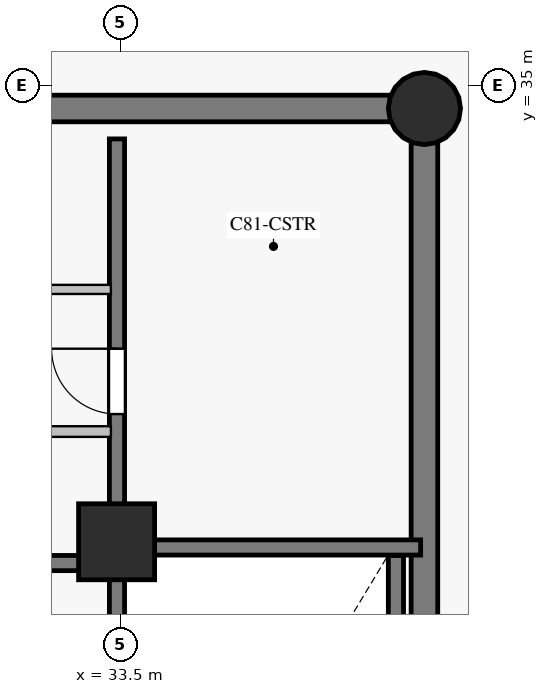
"""IFC4 building model, lengths in metres.
Left out: names, types, materials, properties, quantities, classifications, styles, units other than length and angle.
Written with IfcOpenShell. Run it as: python <this file> out.ifc"""

import sys

from ifc_helpers import new_model, si_unit, direction, frame, frame_2d, origin, origin_with_axes, origin_2d, place, context, subcontext, project, spatial, rectangle, circle, extrude, source, transform, mapped, element, fill, save


model = new_model("IFC4")
c1 = context("Model", 3, precision=1e-05, world=origin(), true_north=direction((0.0, 1.0)))
c2 = subcontext(c1, "Body", "Model", "MODEL_VIEW")
j1 = project(units=[si_unit("LENGTHUNIT", "METRE"), si_unit("PLANEANGLEUNIT", "RADIAN")], contexts=[c1])
p1 = place(None, origin())
s1 = spatial("IfcSite", under=j1, at=p1, CompositionType="ELEMENT")
p2 = place(p1, origin())
s2 = spatial("IfcBuilding", under=s1, at=p2, CompositionType="ELEMENT")
p3 = place(p2, frame((0.0, 0.0, 273.4)))
s3 = spatial("IfcBuildingStorey", under=s2, at=p3, CompositionType="ELEMENT", Elevation=273.4)
p4 = place(p3, frame((37.5, 18.3, 0.0), z_axis=(0.0, 0.0, 1.0), x_axis=(0.0, 1.0, 0.0)))
e1 = element("IfcWall", 1, at=p4, inside=s3, PredefinedType="SHEAR", context=c2, shape_type="SweptSolid", body=[
    extrude(rectangle(XDim=16.4, YDim=0.35, at=frame_2d((8.2, 0.0))), origin(), (0.0, 0.0, 1.0), 16.35),
])
p5 = place(p3, frame((37.5, 34.7, 0.0), z_axis=(0.0, 0.0, 1.0), x_axis=(-1.0, 0.0, 0.0)))
e2 = element("IfcWall", 2, at=p5, inside=s3, PredefinedType="SHEAR", context=c2, shape_type="SweptSolid", body=[
    extrude(rectangle(XDim=10.95, YDim=0.35, at=frame_2d((5.475, 0.0))), origin(), (0.0, 0.0, 1.0), 16.35),
])
p6 = place(p5, frame((7.16, 0.0, 0.0)))
e3 = element("IfcOpeningElement", 3, at=p6, cuts=e2, PredefinedType="OPENING", context=c2, shape_type="SweptSolid", body=[
    extrude(rectangle(XDim=1.1, YDim=2.15, at=frame_2d((0.55, 1.075))), frame((0.0, 0.185, 0.0), z_axis=(0.0, -1.0, 0.0), x_axis=(1.0, 0.0, 0.0)), (0.0, 0.0, 1.0), 0.37),
])
p7 = place(p5, frame((5.16, 0.0, 0.0)))
e4 = element("IfcOpeningElement", 4, at=p7, cuts=e2, PredefinedType="OPENING", context=c2, shape_type="SweptSolid", body=[
    extrude(rectangle(XDim=1.1, YDim=2.15, at=frame_2d((0.55, 1.075))), frame((0.0, 0.185, 0.0), z_axis=(0.0, -1.0, 0.0), x_axis=(1.0, 0.0, 0.0)), (0.0, 0.0, 1.0), 0.37),
])
m1 = source(origin_with_axes(), c2, "Body", "SweptSolid", [
    extrude(circle(Radius=0.475, at=origin_2d()), origin(), (0.0, 0.0, 1.0), 16.6),
])
p8 = place(p3, frame((37.5, 34.7, 0.0), z_axis=(0.0, 0.0, 1.0), x_axis=(1.0, 0.0, 0.0)))
e5 = element("IfcColumn", 5, at=p8, inside=s3, PredefinedType="COLUMN", context=c2, shape_type="MappedRepresentation", body=[
    mapped(m1, transform((0.0, 0.0, 0.0), scale=1.0)),
])
m2 = source(origin_with_axes(), c2, "Body", "SweptSolid", [
    extrude(rectangle(XDim=1.0, YDim=1.0, at=origin_2d()), origin(), (0.0, 0.0, 1.0), 16.6),
])
p9 = place(p3, frame((33.45, 29.0, 0.0), z_axis=(0.0, 0.0, 1.0), x_axis=(1.0, 0.0, 0.0)))
e6 = element("IfcColumn", 6, at=p9, inside=s3, PredefinedType="COLUMN", context=c2, shape_type="MappedRepresentation", body=[
    mapped(m2, transform((0.0, 0.0, 0.0), scale=1.0)),
])
p10 = place(p3, frame((33.455, 18.7, 0.0), z_axis=(0.0, 0.0, 1.0), x_axis=(0.0, 1.0, 0.0)))
e7 = element("IfcWall", 7, at=p10, inside=s3, PredefinedType="SHEAR", context=c2, shape_type="SweptSolid", body=[
    extrude(rectangle(XDim=15.6, YDim=0.2, at=frame_2d((7.8, 0.0))), origin(), (0.0, 0.0, 1.0), 16.35),
])
p11 = place(p10, frame((2.75, 0.0, 0.0)))
e8 = element("IfcOpeningElement", 8, at=p11, cuts=e7, PredefinedType="OPENING", context=c2, shape_type="SweptSolid", body=[
    extrude(rectangle(XDim=1.15, YDim=2.15, at=frame_2d((0.575, 1.075))), frame((0.0, 0.11, 0.0), z_axis=(0.0, -1.0, 0.0), x_axis=(1.0, 0.0, 0.0)), (0.0, 0.0, 1.0), 0.22),
])
p12 = place(p10, frame((0.55, 0.0, 0.0)))
e9 = element("IfcOpeningElement", 9, at=p12, cuts=e7, PredefinedType="OPENING", context=c2, shape_type="SweptSolid", body=[
    extrude(rectangle(XDim=0.94, YDim=2.1, at=frame_2d((0.47, 1.05))), frame((0.0, 0.11, 0.0), z_axis=(0.0, -1.0, 0.0), x_axis=(1.0, 0.0, 0.0)), (0.0, 0.0, 1.0), 0.22),
])
p13 = place(p10, frame((11.98, 0.0, 0.0)))
e10 = element("IfcOpeningElement", 10, at=p13, cuts=e7, PredefinedType="OPENING", context=c2, shape_type="SweptSolid", body=[
    extrude(rectangle(XDim=0.86, YDim=2.04, at=frame_2d((0.43, 1.02))), frame((0.0, 0.11, 0.0), z_axis=(0.0, -1.0, 0.0), x_axis=(1.0, 0.0, 0.0)), (0.0, 0.0, 1.0), 0.22),
])
p14 = place(p3, frame((23.7, 28.72, 0.0), z_axis=(0.0, 0.0, 1.0), x_axis=(1.0, 0.0, 0.0)))
e11 = element("IfcWall", 11, at=p14, inside=s3, PredefinedType="SHEAR", context=c2, shape_type="SweptSolid", body=[
    extrude(rectangle(XDim=9.6, YDim=0.2, at=frame_2d((4.8, 0.0))), origin(), (0.0, 0.0, 1.0), 16.35),
])
p15 = place(p14, frame((4.2, 0.0, 0.0)))
e12 = element("IfcOpeningElement", 12, at=p15, cuts=e11, PredefinedType="OPENING", context=c2, shape_type="SweptSolid", body=[
    extrude(rectangle(XDim=1.0, YDim=2.15, at=frame_2d((0.5, 1.075))), frame((0.0, 0.11, 0.0), z_axis=(0.0, -1.0, 0.0), x_axis=(1.0, 0.0, 0.0)), (0.0, 0.0, 1.0), 0.22),
])
p16 = place(p3, frame((37.125, 21.32, 0.0), z_axis=(0.0, 0.0, 1.0), x_axis=(0.0, 1.0, 0.0)))
e13 = element("IfcWall", 13, at=p16, inside=s3, PredefinedType="SHEAR", context=c2, shape_type="SweptSolid", body=[
    extrude(rectangle(XDim=7.5, YDim=0.2, at=frame_2d((3.75, 0.0))), origin(), (0.0, 0.0, 1.0), 16.35),
])
p17 = place(p3, frame((33.455, 28.925, 0.0), z_axis=(0.0, 0.0, 1.0), x_axis=(1.0, 0.0, 0.0)))
e14 = element("IfcWall", 14, at=p17, inside=s3, PredefinedType="SHEAR", context=c2, shape_type="SweptSolid", body=[
    extrude(rectangle(XDim=3.995, YDim=0.2, at=frame_2d((1.998, 0.0))), origin(), (0.0, 0.0, 1.0), 16.35),
])
p18 = place(p3, frame((31.3, 30.45, 0.0), z_axis=(0.0, 0.0, 1.0), x_axis=(1.0, 0.0, 0.0)))
e15 = element("IfcWall", 15, at=p18, inside=s3, PredefinedType="PARTITIONING", context=c2, shape_type="SweptSolid", body=[
    extrude(rectangle(XDim=2.075, YDim=0.14, at=frame_2d((1.038, 0.0))), origin(), (0.0, 0.0, 1.0), 16.35),
])
p19 = place(p3, frame((31.3, 32.32, 0.0), z_axis=(0.0, 0.0, 1.0), x_axis=(1.0, 0.0, 0.0)))
e16 = element("IfcWall", 16, at=p19, inside=s3, PredefinedType="PARTITIONING", context=c2, shape_type="SweptSolid", body=[
    extrude(rectangle(XDim=2.075, YDim=0.12, at=frame_2d((1.038, 0.0))), origin(), (0.0, 0.0, 1.0), 16.35),
])
m3 = source(origin_with_axes(), c2, "Body", "SweptSolid", [
    extrude(rectangle(XDim=0.86, YDim=2.04, at=frame_2d((0.43, 1.02))), frame((0.0, 0.025, 0.0), z_axis=(0.0, -1.0, 0.0), x_axis=(1.0, 0.0, 0.0)), (0.0, 0.0, 1.0), 0.05),
])
p20 = place(p13, origin())
e17 = element("IfcDoor", 17, at=p20, inside=s3, OperationType="SINGLE_SWING_RIGHT", PredefinedType="DOOR", context=c2, shape_type="MappedRepresentation", body=[
    mapped(m3, transform((0.0, 0.0, 0.0), scale=1.0)),
])
fill(e10, e17)
save(model, sys.argv[1])
